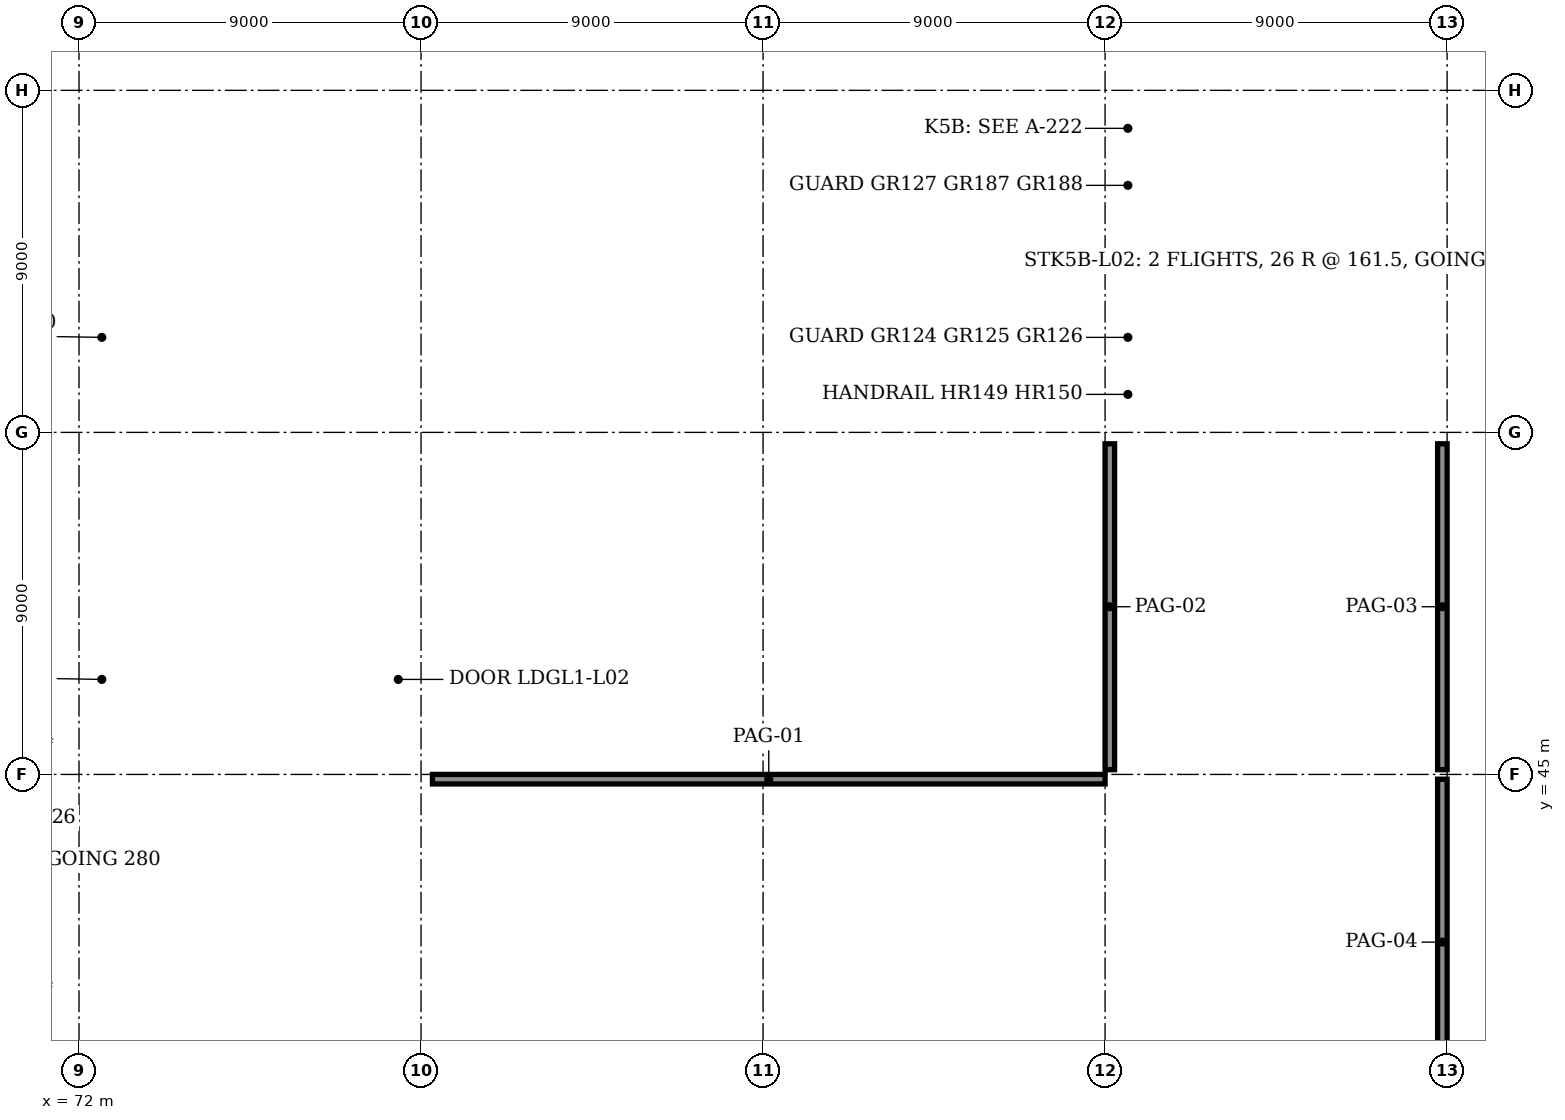
"""IFC4 building model, lengths in metres.
Left out: names, types, materials, properties, quantities, classifications, styles, units other than length and angle.
Written with IfcOpenShell. Run it as: python <this file> out.ifc"""

import sys

from ifc_helpers import new_model, si_unit, direction, frame, frame_2d, origin, origin_2d, place, context, subcontext, project, spatial, rectangle, hollow_rectangle, extrude, element, fill, save


model = new_model("IFC4")
c1 = context("Model", 3, precision=1e-05, world=origin(), true_north=direction((0.0, 1.0)))
c2 = subcontext(c1, "Body", "Model", "MODEL_VIEW")
j1 = project(units=[si_unit("LENGTHUNIT", "METRE"), si_unit("PLANEANGLEUNIT", "RADIAN")], contexts=[c1])
p1 = place(None, origin())
s1 = spatial("IfcSite", under=j1, at=p1, CompositionType="ELEMENT")
p2 = place(p1, origin())
s2 = spatial("IfcBuilding", under=s1, at=p2, CompositionType="ELEMENT")
p3 = place(p2, frame((0.0, 0.0, 9.2)))
s3 = spatial("IfcBuildingStorey", under=s2, at=p3, CompositionType="ELEMENT", Elevation=9.2)
p4 = place(p3, frame((90.0, 45.0, 0.0), z_axis=(0.0, 0.0, 1.0), x_axis=(1.0, 0.0, 0.0)))
e1 = element("IfcColumn", 1, at=p4, inside=s3, PredefinedType="COLUMN", context=c2, shape_type="SweptSolid", body=[
    extrude(hollow_rectangle(XDim=0.25, YDim=0.25, WallThickness=0.01, InnerFilletRadius=0.015, OuterFilletRadius=0.025, at=origin_2d()), origin(), (0.0, 0.0, 1.0), 3.7),
])
p5 = place(p3, frame((99.0, 45.0, 0.0), z_axis=(0.0, 0.0, 1.0), x_axis=(1.0, 0.0, 0.0)))
e2 = element("IfcColumn", 2, at=p5, inside=s3, PredefinedType="COLUMN", context=c2, shape_type="SweptSolid", body=[
    extrude(hollow_rectangle(XDim=0.3, YDim=0.3, WallThickness=0.01, InnerFilletRadius=0.015, OuterFilletRadius=0.025, at=origin_2d()), origin(), (0.0, 0.0, 1.0), 3.7),
])
p6 = place(p3, frame((108.0, 45.0, 0.0), z_axis=(0.0, 0.0, 1.0), x_axis=(1.0, 0.0, 0.0)))
e3 = element("IfcColumn", 3, at=p6, inside=s3, PredefinedType="COLUMN", context=c2, shape_type="SweptSolid", body=[
    extrude(hollow_rectangle(XDim=0.25, YDim=0.25, WallThickness=0.01, InnerFilletRadius=0.015, OuterFilletRadius=0.025, at=origin_2d()), origin(), (0.0, 0.0, 1.0), 3.7),
])
for number, where, z_axis, x_axis in (
    (4, (107.92, 36.0, 0.0), (0.0, 0.0, 1.0), (0.0, 1.0, 0.0)),
    (5, (107.92, 45.125, 0.0), (0.0, 0.0, 1.0), (0.0, 1.0, 0.0)),
):
    element("IfcWall", number, at=place(p3, frame(where, z_axis=z_axis, x_axis=x_axis)), inside=s3, PredefinedType="SOLIDWALL", context=c2, shape_type="SweptSolid", body=[
        extrude(rectangle(XDim=8.875, YDim=0.28, at=frame_2d((4.438, 0.0))), origin(), (0.0, 0.0, 1.0), 2.75),
    ])
p7 = place(p3, frame((90.125, 44.92, 0.0), z_axis=(0.0, 0.0, 1.0), x_axis=(1.0, 0.0, 0.0)))
e6 = element("IfcWall", 6, at=p7, inside=s3, PredefinedType="SOLIDWALL", context=c2, shape_type="SweptSolid", body=[
    extrude(rectangle(XDim=8.725, YDim=0.28, at=frame_2d((4.363, 0.0))), origin(), (0.0, 0.0, 1.0), 2.75),
])
p8 = place(p3, frame((81.0, 44.92, 0.0), z_axis=(0.0, 0.0, 1.0), x_axis=(1.0, 0.0, 0.0)))
e7 = element("IfcWall", 7, at=p8, inside=s3, PredefinedType="SOLIDWALL", context=c2, shape_type="SweptSolid", body=[
    extrude(rectangle(XDim=8.875, YDim=0.28, at=frame_2d((4.438, 0.0))), origin(), (0.0, 0.0, 1.0), 2.75),
])
p9 = place(p3, frame((99.15, 48.375, 0.0), z_axis=(0.0, 0.0, 1.0), x_axis=(0.0, 1.0, 0.0)))
e8 = element("IfcWall", 8, at=p9, inside=s3, PredefinedType="SOLIDWALL", context=c2, shape_type="SweptSolid", body=[
    extrude(rectangle(XDim=2.4, YDim=0.2, at=frame_2d((1.2, 0.0))), origin(), (0.0, 0.0, 1.0), 3.45),
])
p10 = place(p9, frame((0.3, 0.0, 0.0)))
e9 = element("IfcOpeningElement", 9, at=p10, cuts=e8, PredefinedType="OPENING", context=c2, shape_type="SweptSolid", body=[
    extrude(rectangle(XDim=1.8, YDim=2.4, at=frame_2d((0.9, 1.2))), frame((0.0, 0.11, 0.0), z_axis=(0.0, -1.0, 0.0), x_axis=(1.0, 0.0, 0.0)), (0.0, 0.0, 1.0), 0.22),
])
p11 = place(p3, frame((81.3, 44.875, 3.7), z_axis=(0.0, 0.0, 1.0), x_axis=(1.0, 0.0, 0.0)))
e10 = element("IfcWall", 10, at=p11, inside=s3, PredefinedType="PARAPET", context=c2, shape_type="SweptSolid", body=[
    extrude(rectangle(XDim=17.7, YDim=0.25, at=frame_2d((8.85, 0.0))), origin(), (0.0, 0.0, 1.0), 1.6),
])
for number, where, z_axis, x_axis in (
    (11, (99.125, 45.125, 3.7), (0.0, 0.0, 1.0), (0.0, 1.0, 0.0)),
    (12, (107.875, 45.125, 3.7), (0.0, 0.0, 1.0), (0.0, 1.0, 0.0)),
    (13, (107.875, 36.3, 3.7), (0.0, 0.0, 1.0), (0.0, 1.0, 0.0)),
):
    element("IfcWall", number, at=place(p3, frame(where, z_axis=z_axis, x_axis=x_axis)), inside=s3, PredefinedType="PARAPET", context=c2, shape_type="SweptSolid", body=[
        extrude(rectangle(XDim=8.575, YDim=0.25, at=frame_2d((4.288, 0.0))), origin(), (0.0, 0.0, 1.0), 1.6),
    ])
p12 = place(p3, frame((63.0, 40.65, 0.0), z_axis=(0.0, 0.0, 1.0), x_axis=(1.0, 0.0, 0.0)))
e14 = element("IfcWall", 14, at=p12, inside=s3, PredefinedType="SOLIDWALL", context=c2, shape_type="SweptSolid", body=[
    extrude(rectangle(XDim=9.0, YDim=0.3, at=frame_2d((4.5, 0.0))), origin(), (0.0, 0.0, 1.0), 4.2),
])
p13 = place(p3, frame((71.85, 40.8, 0.0), z_axis=(0.0, 0.0, 1.0), x_axis=(0.0, 1.0, 0.0)))
e15 = element("IfcWall", 15, at=p13, inside=s3, PredefinedType="SOLIDWALL", context=c2, shape_type="SweptSolid", body=[
    extrude(rectangle(XDim=3.9, YDim=0.3, at=frame_2d((1.95, 0.0))), origin(), (0.0, 0.0, 1.0), 4.2),
])
p14 = place(p3, frame((63.0, 44.85, 0.0), z_axis=(0.0, 0.0, 1.0), x_axis=(1.0, 0.0, 0.0)))
e16 = element("IfcWall", 16, at=p14, inside=s3, PredefinedType="SOLIDWALL", context=c2, shape_type="SweptSolid", body=[
    extrude(rectangle(XDim=9.0, YDim=0.3, at=frame_2d((4.5, 0.0))), origin(), (0.0, 0.0, 1.0), 4.2),
])
p15 = place(p3, frame((72.0, 54.15, 0.0), z_axis=(0.0, 0.0, 1.0), x_axis=(1.0, 0.0, 0.0)))
e17 = element("IfcWall", 17, at=p15, inside=s3, PredefinedType="SOLIDWALL", context=c2, shape_type="SweptSolid", body=[
    extrude(rectangle(XDim=9.0, YDim=0.3, at=frame_2d((4.5, 0.0))), origin(), (0.0, 0.0, 1.0), 3.7),
])
p16 = place(p3, frame((80.85, 54.3, 0.0), z_axis=(0.0, 0.0, 1.0), x_axis=(0.0, 1.0, 0.0)))
e18 = element("IfcWall", 18, at=p16, inside=s3, PredefinedType="SOLIDWALL", context=c2, shape_type="SweptSolid", body=[
    extrude(rectangle(XDim=8.4, YDim=0.3, at=frame_2d((4.2, 0.0))), origin(), (0.0, 0.0, 1.0), 3.7),
])
p17 = place(p16, frame((3.65, 0.0, 0.0)))
e19 = element("IfcOpeningElement", 19, at=p17, cuts=e18, PredefinedType="OPENING", context=c2, shape_type="SweptSolid", body=[
    extrude(rectangle(XDim=1.8, YDim=2.1, at=frame_2d((0.9, 1.05))), frame((0.0, 0.16, 0.0), z_axis=(0.0, -1.0, 0.0), x_axis=(1.0, 0.0, 0.0)), (0.0, 0.0, 1.0), 0.32),
])
p18 = place(p3, frame((72.0, 62.85, 0.0), z_axis=(0.0, 0.0, 1.0), x_axis=(1.0, 0.0, 0.0)))
e20 = element("IfcWall", 20, at=p18, inside=s3, PredefinedType="SOLIDWALL", context=c2, shape_type="SweptSolid", body=[
    extrude(rectangle(XDim=9.0, YDim=0.3, at=frame_2d((4.5, 0.0))), origin(), (0.0, 0.0, 1.0), 3.7),
])
p19 = place(p3, frame((72.15, 54.3, 0.0), z_axis=(0.0, 0.0, 1.0), x_axis=(0.0, 1.0, 0.0)))
e21 = element("IfcWall", 21, at=p19, inside=s3, PredefinedType="SOLIDWALL", context=c2, shape_type="SweptSolid", body=[
    extrude(rectangle(XDim=8.4, YDim=0.3, at=frame_2d((4.2, 0.0))), origin(), (0.0, 0.0, 1.0), 3.7),
])
p20 = place(p3, frame((99.0, 54.15, 0.0), z_axis=(0.0, 0.0, 1.0), x_axis=(1.0, 0.0, 0.0)))
e22 = element("IfcWall", 22, at=p20, inside=s3, PredefinedType="SOLIDWALL", context=c2, shape_type="SweptSolid", body=[
    extrude(rectangle(XDim=9.0, YDim=0.3, at=frame_2d((4.5, 0.0))), origin(), (0.0, 0.0, 1.0), 4.2),
])
p21 = place(p20, frame((1.35, 0.0, 0.0)))
e23 = element("IfcOpeningElement", 23, at=p21, cuts=e22, PredefinedType="OPENING", context=c2, shape_type="SweptSolid", body=[
    extrude(rectangle(XDim=1.8, YDim=2.1, at=frame_2d((0.9, 1.05))), frame((0.0, 0.16, 0.0), z_axis=(0.0, -1.0, 0.0), x_axis=(1.0, 0.0, 0.0)), (0.0, 0.0, 1.0), 0.32),
])
p22 = place(p3, frame((107.85, 54.3, 0.0), z_axis=(0.0, 0.0, 1.0), x_axis=(0.0, 1.0, 0.0)))
e24 = element("IfcWall", 24, at=p22, inside=s3, PredefinedType="SOLIDWALL", context=c2, shape_type="SweptSolid", body=[
    extrude(rectangle(XDim=8.4, YDim=0.3, at=frame_2d((4.2, 0.0))), origin(), (0.0, 0.0, 1.0), 4.2),
])
p23 = place(p3, frame((99.0, 62.85, 0.0), z_axis=(0.0, 0.0, 1.0), x_axis=(1.0, 0.0, 0.0)))
e25 = element("IfcWall", 25, at=p23, inside=s3, PredefinedType="SOLIDWALL", context=c2, shape_type="SweptSolid", body=[
    extrude(rectangle(XDim=9.0, YDim=0.3, at=frame_2d((4.5, 0.0))), origin(), (0.0, 0.0, 1.0), 4.2),
])
p24 = place(p3, frame((99.15, 54.3, 0.0), z_axis=(0.0, 0.0, 1.0), x_axis=(0.0, 1.0, 0.0)))
e26 = element("IfcWall", 26, at=p24, inside=s3, PredefinedType="SOLIDWALL", context=c2, shape_type="SweptSolid", body=[
    extrude(rectangle(XDim=8.4, YDim=0.3, at=frame_2d((4.2, 0.0))), origin(), (0.0, 0.0, 1.0), 4.2),
])
p25 = place(p3, frame((72.0, 45.15, 0.0), z_axis=(0.0, 0.0, 1.0), x_axis=(1.0, 0.0, 0.0)))
e27 = element("IfcWall", 27, at=p25, inside=s3, PredefinedType="SOLIDWALL", context=c2, shape_type="SweptSolid", body=[
    extrude(rectangle(XDim=9.0, YDim=0.3, at=frame_2d((4.5, 0.0))), origin(), (0.0, 0.0, 1.0), 4.2),
])
p26 = place(p25, frame((3.3, 0.0, 0.0)))
e28 = element("IfcOpeningElement", 28, at=p26, cuts=e27, PredefinedType="OPENING", context=c2, shape_type="SweptSolid", body=[
    extrude(rectangle(XDim=2.4, YDim=2.4, at=frame_2d((1.2, 1.2))), frame((0.0, 0.16, 0.0), z_axis=(0.0, -1.0, 0.0), x_axis=(1.0, 0.0, 0.0)), (0.0, 0.0, 1.0), 0.32),
])
p27 = place(p3, frame((80.85, 45.3, 0.0), z_axis=(0.0, 0.0, 1.0), x_axis=(0.0, 1.0, 0.0)))
e29 = element("IfcWall", 29, at=p27, inside=s3, PredefinedType="SOLIDWALL", context=c2, shape_type="SweptSolid", body=[
    extrude(rectangle(XDim=8.4, YDim=0.3, at=frame_2d((4.2, 0.0))), origin(), (0.0, 0.0, 1.0), 4.2),
])
p28 = place(p3, frame((72.0, 53.85, 0.0), z_axis=(0.0, 0.0, 1.0), x_axis=(1.0, 0.0, 0.0)))
e30 = element("IfcWall", 30, at=p28, inside=s3, PredefinedType="SOLIDWALL", context=c2, shape_type="SweptSolid", body=[
    extrude(rectangle(XDim=9.0, YDim=0.3, at=frame_2d((4.5, 0.0))), origin(), (0.0, 0.0, 1.0), 4.2),
])
p29 = place(p3, frame((72.15, 45.3, 0.0), z_axis=(0.0, 0.0, 1.0), x_axis=(0.0, 1.0, 0.0)))
e31 = element("IfcWall", 31, at=p29, inside=s3, PredefinedType="SOLIDWALL", context=c2, shape_type="SweptSolid", body=[
    extrude(rectangle(XDim=8.4, YDim=0.3, at=frame_2d((4.2, 0.0))), origin(), (0.0, 0.0, 1.0), 4.2),
])
p30 = place(p3, frame((76.95, 47.95, 0.0), z_axis=(0.0, 0.0, 1.0), x_axis=(0.0, 1.0, 0.0)))
e32 = element("IfcWall", 32, at=p30, inside=s3, PredefinedType="SOLIDWALL", context=c2, shape_type="SweptSolid", body=[
    extrude(rectangle(XDim=3.1, YDim=0.3, at=frame_2d((1.55, 0.0))), origin(), (0.0, 0.0, 1.0), 4.2),
])
p31 = place(p30, frame((0.35, 0.0, 0.0)))
e33 = element("IfcOpeningElement", 33, at=p31, cuts=e32, PredefinedType="OPENING", context=c2, shape_type="SweptSolid", body=[
    extrude(rectangle(XDim=2.4, YDim=2.4, at=frame_2d((1.2, 1.2))), frame((0.0, 0.16, 0.0), z_axis=(0.0, -1.0, 0.0), x_axis=(1.0, 0.0, 0.0)), (0.0, 0.0, 1.0), 0.32),
])
for number, where, z_axis, x_axis in (
    (34, (72.15, 47.95, 0.0), (0.0, 0.0, 1.0), (1.0, 0.0, 0.0)),
    (35, (72.15, 51.05, 0.0), (0.0, 0.0, 1.0), (1.0, 0.0, 0.0)),
):
    element("IfcWall", number, at=place(p3, frame(where, z_axis=z_axis, x_axis=x_axis)), inside=s3, PredefinedType="SOLIDWALL", context=c2, shape_type="SweptSolid", body=[
        extrude(rectangle(XDim=4.8, YDim=0.3, at=frame_2d((2.4, 0.0))), origin(), (0.0, 0.0, 1.0), 4.2),
    ])
p32 = place(p3, frame((71.925, 36.0, 0.0), z_axis=(0.0, 0.0, 1.0), x_axis=(0.0, 1.0, 0.0)))
e36 = element("IfcWall", 36, at=p32, inside=s3, PredefinedType="PARTITIONING", context=c2, shape_type="SweptSolid", body=[
    extrude(rectangle(XDim=3.0, YDim=0.15, at=frame_2d((1.5, 0.0))), origin(), (0.0, 0.0, 1.0), 3.035),
])
p33 = place(p3, frame((71.925, 39.0, 0.0), z_axis=(0.0, 0.0, 1.0), x_axis=(0.0, 1.0, 0.0)))
e37 = element("IfcWall", 37, at=p33, inside=s3, PredefinedType="PARTITIONING", context=c2, shape_type="SweptSolid", body=[
    extrude(rectangle(XDim=1.5, YDim=0.15, at=frame_2d((0.75, 0.0))), origin(), (0.0, 0.0, 1.0), 3.035),
])
p34 = place(p3, frame((72.0, 39.0, 0.0), z_axis=(0.0, 0.0, 1.0), x_axis=(1.0, 0.0, 0.0)))
e38 = element("IfcWall", 38, at=p34, inside=s3, PredefinedType="PARTITIONING", context=c2, shape_type="SweptSolid", body=[
    extrude(rectangle(XDim=9.0, YDim=0.1, at=frame_2d((4.5, 0.0))), origin(), (0.0, 0.0, 1.0), 2.658),
])
p35 = place(p34, frame((3.95, 0.0, 0.0)))
e39 = element("IfcOpeningElement", 39, at=p35, cuts=e38, PredefinedType="OPENING", context=c2, shape_type="SweptSolid", body=[
    extrude(rectangle(XDim=1.0, YDim=2.1, at=frame_2d((0.5, 1.05))), frame((0.0, 0.06, 0.0), z_axis=(0.0, -1.0, 0.0), x_axis=(1.0, 0.0, 0.0)), (0.0, 0.0, 1.0), 0.12),
])
p36 = place(p3, frame((81.0, 39.0, 0.0), z_axis=(0.0, 0.0, 1.0), x_axis=(1.0, 0.0, 0.0)))
e40 = element("IfcWall", 40, at=p36, inside=s3, PredefinedType="PARTITIONING", context=c2, shape_type="SweptSolid", body=[
    extrude(rectangle(XDim=9.0, YDim=0.15, at=frame_2d((4.5, 0.0))), origin(), (0.0, 0.0, 1.0), 2.658),
])
p37 = place(p36, frame((3.985, 0.0, 0.0)))
e41 = element("IfcOpeningElement", 41, at=p37, cuts=e40, PredefinedType="OPENING", context=c2, shape_type="SweptSolid", body=[
    extrude(rectangle(XDim=1.0, YDim=2.1, at=frame_2d((0.5, 1.05))), frame((0.0, 0.085, 0.0), z_axis=(0.0, -1.0, 0.0), x_axis=(1.0, 0.0, 0.0)), (0.0, 0.0, 1.0), 0.17),
])
p38 = place(p3, frame((90.0, 39.0, 0.0), z_axis=(0.0, 0.0, 1.0), x_axis=(1.0, 0.0, 0.0)))
e42 = element("IfcWall", 42, at=p38, inside=s3, PredefinedType="PARTITIONING", context=c2, shape_type="SweptSolid", body=[
    extrude(rectangle(XDim=9.0, YDim=0.15, at=frame_2d((4.5, 0.0))), origin(), (0.0, 0.0, 1.0), 2.658),
])
p39 = place(p38, frame((3.985, 0.0, 0.0)))
e43 = element("IfcOpeningElement", 43, at=p39, cuts=e42, PredefinedType="OPENING", context=c2, shape_type="SweptSolid", body=[
    extrude(rectangle(XDim=1.0, YDim=2.1, at=frame_2d((0.5, 1.05))), frame((0.0, 0.085, 0.0), z_axis=(0.0, -1.0, 0.0), x_axis=(1.0, 0.0, 0.0)), (0.0, 0.0, 1.0), 0.17),
])
p40 = place(p3, frame((99.0, 39.0, 0.0), z_axis=(0.0, 0.0, 1.0), x_axis=(1.0, 0.0, 0.0)))
e44 = element("IfcWall", 44, at=p40, inside=s3, PredefinedType="PARTITIONING", context=c2, shape_type="SweptSolid", body=[
    extrude(rectangle(XDim=9.0, YDim=0.15, at=frame_2d((4.5, 0.0))), origin(), (0.0, 0.0, 1.0), 2.658),
])
p41 = place(p40, frame((3.985, 0.0, 0.0)))
e45 = element("IfcOpeningElement", 45, at=p41, cuts=e44, PredefinedType="OPENING", context=c2, shape_type="SweptSolid", body=[
    extrude(rectangle(XDim=1.0, YDim=2.1, at=frame_2d((0.5, 1.05))), frame((0.0, 0.085, 0.0), z_axis=(0.0, -1.0, 0.0), x_axis=(1.0, 0.0, 0.0)), (0.0, 0.0, 1.0), 0.17),
])
p42 = place(p3, frame((81.0, 39.0, 0.0), z_axis=(0.0, 0.0, 1.0), x_axis=(0.0, 1.0, 0.0)))
e46 = element("IfcWall", 46, at=p42, inside=s3, PredefinedType="PARTITIONING", context=c2, shape_type="SweptSolid", body=[
    extrude(rectangle(XDim=6.0, YDim=0.15, at=frame_2d((3.0, 0.0))), origin(), (0.0, 0.0, 1.0), 2.658),
])
p43 = place(p3, frame((90.0, 39.0, 0.0), z_axis=(0.0, 0.0, 1.0), x_axis=(0.0, 1.0, 0.0)))
e47 = element("IfcWall", 47, at=p43, inside=s3, PredefinedType="PARTITIONING", context=c2, shape_type="SweptSolid", body=[
    extrude(rectangle(XDim=5.875, YDim=0.125, at=frame_2d((2.938, 0.0))), origin(), (0.0, 0.0, 1.0), 2.658),
])
p44 = place(p3, frame((99.0, 39.0, 0.0), z_axis=(0.0, 0.0, 1.0), x_axis=(0.0, 1.0, 0.0)))
e48 = element("IfcWall", 48, at=p44, inside=s3, PredefinedType="PARTITIONING", context=c2, shape_type="SweptSolid", body=[
    extrude(rectangle(XDim=5.85, YDim=0.125, at=frame_2d((2.925, 0.0))), origin(), (0.0, 0.0, 1.0), 2.658),
])
p45 = place(p10, origin())
e49 = element("IfcDoor", 49, at=p45, inside=s3, OperationType="DOUBLE_DOOR_SINGLE_SWING", PredefinedType="DOOR", context=c2, shape_type="SweptSolid", body=[
    extrude(rectangle(XDim=1.8, YDim=2.4, at=frame_2d((0.9, 1.2))), frame((0.0, 0.025, 0.0), z_axis=(0.0, -1.0, 0.0), x_axis=(1.0, 0.0, 0.0)), (0.0, 0.0, 1.0), 0.05),
])
fill(e9, e49)
p46 = place(p17, origin())
e50 = element("IfcDoor", 50, at=p46, inside=s3, OperationType="DOUBLE_DOOR_SINGLE_SWING", PredefinedType="DOOR", context=c2, shape_type="SweptSolid", body=[
    extrude(rectangle(XDim=1.8, YDim=2.1, at=frame_2d((0.9, 1.05))), frame((0.0, 0.025, 0.0), z_axis=(0.0, -1.0, 0.0), x_axis=(1.0, 0.0, 0.0)), (0.0, 0.0, 1.0), 0.05),
])
fill(e19, e50)
p47 = place(p21, origin())
e51 = element("IfcDoor", 51, at=p47, inside=s3, OperationType="DOUBLE_DOOR_SINGLE_SWING", PredefinedType="DOOR", context=c2, shape_type="SweptSolid", body=[
    extrude(rectangle(XDim=1.8, YDim=2.1, at=frame_2d((0.9, 1.05))), frame((0.0, 0.025, 0.0), z_axis=(0.0, -1.0, 0.0), x_axis=(1.0, 0.0, 0.0)), (0.0, 0.0, 1.0), 0.05),
])
fill(e23, e51)
p48 = place(p31, origin())
e52 = element("IfcDoor", 52, at=p48, inside=s3, OperationType="DOUBLE_DOOR_SLIDING", PredefinedType="DOOR", context=c2, shape_type="SweptSolid", body=[
    extrude(rectangle(XDim=2.4, YDim=2.4, at=frame_2d((1.2, 1.2))), frame((0.0, 0.025, 0.0), z_axis=(0.0, -1.0, 0.0), x_axis=(1.0, 0.0, 0.0)), (0.0, 0.0, 1.0), 0.05),
])
fill(e33, e52)
p49 = place(p26, frame((2.4, 0.0, 0.0), z_axis=(0.0, 0.0, 1.0), x_axis=(-1.0, 0.0, 0.0)))
e53 = element("IfcDoor", 53, at=p49, inside=s3, OperationType="DOUBLE_DOOR_SINGLE_SWING", PredefinedType="DOOR", context=c2, shape_type="SweptSolid", body=[
    extrude(rectangle(XDim=2.4, YDim=2.4, at=frame_2d((1.2, 1.2))), frame((0.0, 0.025, 0.0), z_axis=(0.0, -1.0, 0.0), x_axis=(1.0, 0.0, 0.0)), (0.0, 0.0, 1.0), 0.05),
])
fill(e28, e53)
p50 = place(p35, frame((1.0, 0.0, 0.0), z_axis=(0.0, 0.0, 1.0), x_axis=(-1.0, 0.0, 0.0)))
e54 = element("IfcDoor", 54, at=p50, inside=s3, OperationType="SINGLE_SWING_RIGHT", PredefinedType="DOOR", context=c2, shape_type="SweptSolid", body=[
    extrude(rectangle(XDim=1.0, YDim=2.1, at=frame_2d((0.5, 1.05))), frame((0.0, 0.025, 0.0), z_axis=(0.0, -1.0, 0.0), x_axis=(1.0, 0.0, 0.0)), (0.0, 0.0, 1.0), 0.05),
])
fill(e39, e54)
p51 = place(p41, origin())
e55 = element("IfcDoor", 55, at=p51, inside=s3, OperationType="SINGLE_SWING_RIGHT", PredefinedType="DOOR", context=c2, shape_type="SweptSolid", body=[
    extrude(rectangle(XDim=1.0, YDim=2.1, at=frame_2d((0.5, 1.05))), frame((0.0, 0.025, 0.0), z_axis=(0.0, -1.0, 0.0), x_axis=(1.0, 0.0, 0.0)), (0.0, 0.0, 1.0), 0.05),
])
fill(e45, e55)
p52 = place(p37, origin())
e56 = element("IfcDoor", 56, at=p52, inside=s3, OperationType="SINGLE_SWING_LEFT", PredefinedType="DOOR", context=c2, shape_type="SweptSolid", body=[
    extrude(rectangle(XDim=1.0, YDim=2.1, at=frame_2d((0.5, 1.05))), frame((0.0, 0.025, 0.0), z_axis=(0.0, -1.0, 0.0), x_axis=(1.0, 0.0, 0.0)), (0.0, 0.0, 1.0), 0.05),
])
fill(e41, e56)
p53 = place(p39, origin())
e57 = element("IfcDoor", 57, at=p53, inside=s3, OperationType="SINGLE_SWING_RIGHT", PredefinedType="DOOR", context=c2, shape_type="SweptSolid", body=[
    extrude(rectangle(XDim=1.0, YDim=2.1, at=frame_2d((0.5, 1.05))), frame((0.0, 0.025, 0.0), z_axis=(0.0, -1.0, 0.0), x_axis=(1.0, 0.0, 0.0)), (0.0, 0.0, 1.0), 0.05),
])
fill(e43, e57)
save(model, sys.argv[1])
